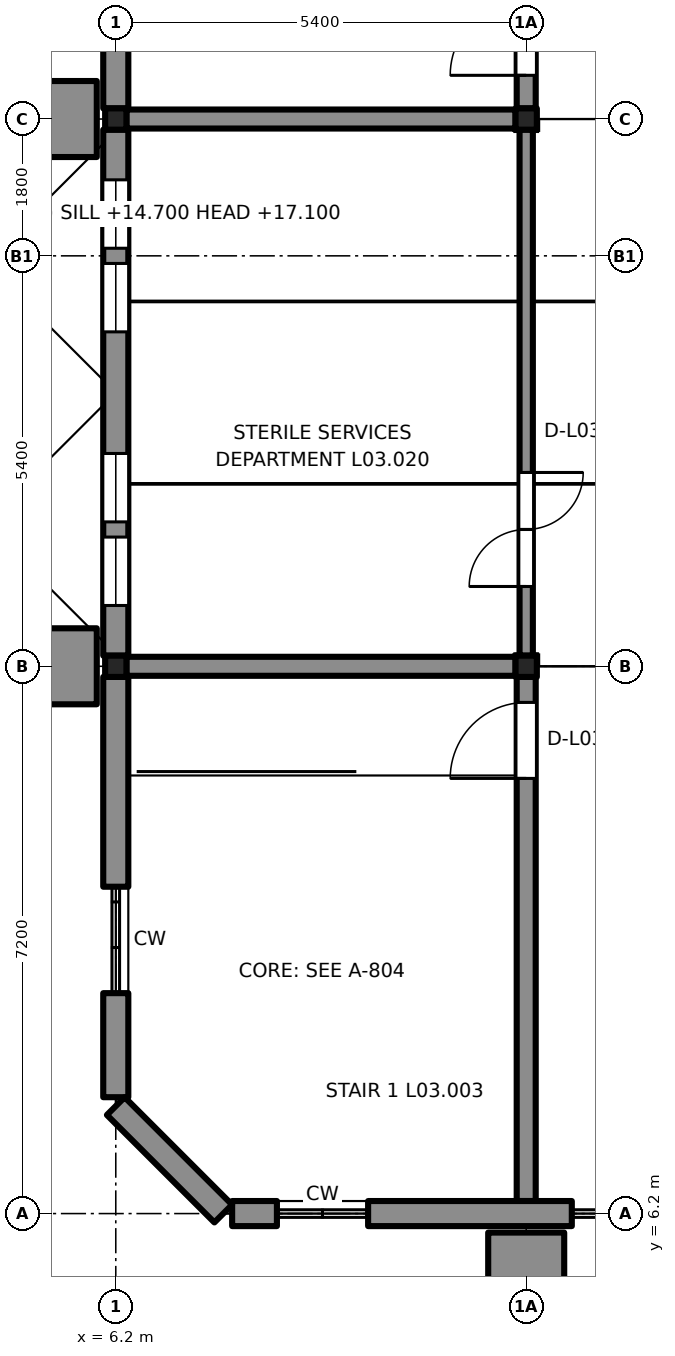
"""IFC4 building model, lengths in metres.
Left out: names, types, materials, properties, quantities, classifications, styles, units other than length and angle.
Written with IfcOpenShell. Run it as: python <this file> out.ifc"""

import sys

from ifc_helpers import new_model, si_unit, direction, frame, frame_2d, origin, origin_2d, place, context, subcontext, project, spatial, rectangle, extrude, element, fill, save


model = new_model("IFC4")
c1 = context("Model", 3, precision=1e-05, world=origin(), true_north=direction((0.0, 1.0)))
c2 = subcontext(c1, "Body", "Model", "MODEL_VIEW")
j1 = project(units=[si_unit("LENGTHUNIT", "METRE"), si_unit("PLANEANGLEUNIT", "RADIAN")], contexts=[c1])
p1 = place(None, origin())
s1 = spatial("IfcSite", under=j1, at=p1, CompositionType="ELEMENT")
p2 = place(p1, origin())
s2 = spatial("IfcBuilding", under=s1, at=p2, CompositionType="ELEMENT")
p3 = place(p2, frame((0.0, 0.0, 14.1)))
s3 = spatial("IfcBuildingStorey", under=s2, at=p3, CompositionType="ELEMENT", Elevation=14.1)
for number, where, z_axis, x_axis in (
    (1, (6.2, 13.4, 0.0), (0.0, 0.0, 1.0), (1.0, 0.0, 0.0)),
    (2, (11.6, 13.4, 0.0), (0.0, 0.0, 1.0), (1.0, 0.0, 0.0)),
    (3, (6.2, 20.6, 0.0), (0.0, 0.0, 1.0), (1.0, 0.0, 0.0)),
    (4, (11.6, 20.6, 0.0), (0.0, 0.0, 1.0), (1.0, 0.0, 0.0)),
):
    element("IfcColumn", number, at=place(p3, frame(where, z_axis=z_axis, x_axis=x_axis)), inside=s3, PredefinedType="COLUMN", context=c2, shape_type="SweptSolid", body=[
        extrude(rectangle(XDim=0.28, YDim=0.28, at=origin_2d()), origin(), (0.0, 0.0, 1.0), 3.9),
    ])
p4 = place(p3, frame((11.6, 6.365, 0.0), z_axis=(0.0, 0.0, 1.0), x_axis=(0.0, 1.0, 0.0)))
e5 = element("IfcWall", 5, at=p4, inside=s3, PredefinedType="SHEAR", context=c2, shape_type="SweptSolid", body=[
    extrude(rectangle(XDim=6.895, YDim=0.25, at=frame_2d((3.448, 0.0))), origin(), (0.0, 0.0, 1.0), 3.2),
])
p5 = place(p4, frame((5.56, 0.0, 0.0)))
e6 = element("IfcOpeningElement", 6, at=p5, cuts=e5, PredefinedType="OPENING", context=c2, shape_type="SweptSolid", body=[
    extrude(rectangle(XDim=1.0, YDim=2.1, at=frame_2d((0.5, 1.05))), frame((0.0, 0.135, 0.0), z_axis=(0.0, -1.0, 0.0), x_axis=(1.0, 0.0, 0.0)), (0.0, 0.0, 1.0), 0.27),
])
p6 = place(p3, frame((6.34, 13.4, 0.0), z_axis=(0.0, 0.0, 1.0), x_axis=(1.0, 0.0, 0.0)))
e7 = element("IfcWall", 7, at=p6, inside=s3, PredefinedType="SHEAR", context=c2, shape_type="SweptSolid", body=[
    extrude(rectangle(XDim=5.12, YDim=0.25, at=frame_2d((2.56, 0.0))), origin(), (0.0, 0.0, 1.0), 3.2),
])
p7 = place(p3, frame((11.6, 20.74, 0.0), z_axis=(0.0, 0.0, 1.0), x_axis=(0.0, 1.0, 0.0)))
e8 = element("IfcWall", 8, at=p7, inside=s3, PredefinedType="SHEAR", context=c2, shape_type="SweptSolid", body=[
    extrude(rectangle(XDim=6.92, YDim=0.25, at=frame_2d((3.46, 0.0))), origin(), (0.0, 0.0, 1.0), 3.2),
])
p8 = place(p7, frame((0.435, 0.0, 0.0)))
e9 = element("IfcOpeningElement", 9, at=p8, cuts=e8, PredefinedType="OPENING", context=c2, shape_type="SweptSolid", body=[
    extrude(rectangle(XDim=1.0, YDim=2.1, at=frame_2d((0.5, 1.05))), frame((0.0, 0.135, 0.0), z_axis=(0.0, -1.0, 0.0), x_axis=(1.0, 0.0, 0.0)), (0.0, 0.0, 1.0), 0.27),
])
p9 = place(p3, frame((6.34, 20.6, 0.0), z_axis=(0.0, 0.0, 1.0), x_axis=(1.0, 0.0, 0.0)))
e10 = element("IfcWall", 10, at=p9, inside=s3, PredefinedType="SHEAR", context=c2, shape_type="SweptSolid", body=[
    extrude(rectangle(XDim=5.12, YDim=0.25, at=frame_2d((2.56, 0.0))), origin(), (0.0, 0.0, 1.0), 3.2),
])
p10 = place(p3, frame((6.2, 7.731, 0.0), z_axis=(0.0, 0.0, 1.0), x_axis=(0.0, 1.0, 0.0)))
e11 = element("IfcWall", 11, at=p10, inside=s3, PredefinedType="SOLIDWALL", context=c2, shape_type="SweptSolid", body=[
    extrude(rectangle(XDim=1.369, YDim=0.33, at=frame_2d((0.685, 0.0))), origin(), (0.0, 0.0, 1.0), 3.2),
])
p11 = place(p3, frame((6.2, 10.5, 0.0), z_axis=(0.0, 0.0, 1.0), x_axis=(0.0, 1.0, 0.0)))
e12 = element("IfcWall", 12, at=p11, inside=s3, PredefinedType="SOLIDWALL", context=c2, shape_type="SweptSolid", body=[
    extrude(rectangle(XDim=2.76, YDim=0.33, at=frame_2d((1.38, 0.0))), origin(), (0.0, 0.0, 1.0), 3.2),
])
p12 = place(p3, frame((6.2, 13.54, 0.0), z_axis=(0.0, 0.0, 1.0), x_axis=(0.0, 1.0, 0.0)))
e13 = element("IfcWall", 13, at=p12, inside=s3, PredefinedType="SOLIDWALL", context=c2, shape_type="SweptSolid", body=[
    extrude(rectangle(XDim=6.92, YDim=0.33, at=frame_2d((3.46, 0.0))), origin(), (0.0, 0.0, 1.0), 3.2),
])
p13 = place(p12, frame((0.66, 0.0, 0.6)))
e14 = element("IfcOpeningElement", 14, at=p13, cuts=e13, PredefinedType="OPENING", context=c2, shape_type="SweptSolid", body=[
    extrude(rectangle(XDim=0.9, YDim=2.4, at=frame_2d((0.45, 1.2))), frame((0.0, 0.175, 0.0), z_axis=(0.0, -1.0, 0.0), x_axis=(1.0, 0.0, 0.0)), (0.0, 0.0, 1.0), 0.35),
])
p14 = place(p12, frame((1.76, 0.0, 0.6)))
e15 = element("IfcOpeningElement", 15, at=p14, cuts=e13, PredefinedType="OPENING", context=c2, shape_type="SweptSolid", body=[
    extrude(rectangle(XDim=0.9, YDim=2.4, at=frame_2d((0.45, 1.2))), frame((0.0, 0.175, 0.0), z_axis=(0.0, -1.0, 0.0), x_axis=(1.0, 0.0, 0.0)), (0.0, 0.0, 1.0), 0.35),
])
p15 = place(p12, frame((4.26, 0.0, 0.6)))
e16 = element("IfcOpeningElement", 16, at=p15, cuts=e13, PredefinedType="OPENING", context=c2, shape_type="SweptSolid", body=[
    extrude(rectangle(XDim=0.9, YDim=2.4, at=frame_2d((0.45, 1.2))), frame((0.0, 0.175, 0.0), z_axis=(0.0, -1.0, 0.0), x_axis=(1.0, 0.0, 0.0)), (0.0, 0.0, 1.0), 0.35),
])
p16 = place(p12, frame((5.36, 0.0, 0.6)))
e17 = element("IfcOpeningElement", 17, at=p16, cuts=e13, PredefinedType="OPENING", context=c2, shape_type="SweptSolid", body=[
    extrude(rectangle(XDim=0.9, YDim=2.4, at=frame_2d((0.45, 1.2))), frame((0.0, 0.175, 0.0), z_axis=(0.0, -1.0, 0.0), x_axis=(1.0, 0.0, 0.0)), (0.0, 0.0, 1.0), 0.35),
])
p17 = place(p3, frame((6.2, 20.74, 0.0), z_axis=(0.0, 0.0, 1.0), x_axis=(0.0, 1.0, 0.0)))
e18 = element("IfcWall", 18, at=p17, inside=s3, PredefinedType="SOLIDWALL", context=c2, shape_type="SweptSolid", body=[
    extrude(rectangle(XDim=2.76, YDim=0.33, at=frame_2d((1.38, 0.0))), origin(), (0.0, 0.0, 1.0), 3.2),
])
for number, where, z_axis, x_axis in (
    (19, (5.575, 12.9, 0.0), (0.0, 0.0, 1.0), (0.0, 1.0, 0.0)),
    (20, (5.575, 20.1, 0.0), (0.0, 0.0, 1.0), (0.0, 1.0, 0.0)),
):
    element("IfcWall", number, at=place(p3, frame(where, z_axis=z_axis, x_axis=x_axis)), inside=s3, PredefinedType="SOLIDWALL", context=c2, shape_type="SweptSolid", body=[
        extrude(rectangle(XDim=1.0, YDim=0.75, at=frame_2d((0.5, 0.0))), origin(), (0.0, 0.0, 1.0), 3.9),
    ])
p18 = place(p3, frame((8.32, 6.2, 0.0), z_axis=(0.0, 0.0, 1.0), x_axis=(-1.0, 0.0, 0.0)))
e21 = element("IfcWall", 21, at=p18, inside=s3, PredefinedType="SOLIDWALL", context=c2, shape_type="SweptSolid", body=[
    extrude(rectangle(XDim=0.589, YDim=0.33, at=frame_2d((0.294, 0.0))), origin(), (0.0, 0.0, 1.0), 3.2),
])
p19 = place(p3, frame((12.2, 6.2, 0.0), z_axis=(0.0, 0.0, 1.0), x_axis=(-1.0, 0.0, 0.0)))
e22 = element("IfcWall", 22, at=p19, inside=s3, PredefinedType="SOLIDWALL", context=c2, shape_type="SweptSolid", body=[
    extrude(rectangle(XDim=2.68, YDim=0.33, at=frame_2d((1.34, 0.0))), origin(), (0.0, 0.0, 1.0), 3.2),
])
p20 = place(p3, frame((12.1, 5.575, 0.0), z_axis=(0.0, 0.0, 1.0), x_axis=(-1.0, 0.0, 0.0)))
e23 = element("IfcWall", 23, at=p20, inside=s3, PredefinedType="SOLIDWALL", context=c2, shape_type="SweptSolid", body=[
    extrude(rectangle(XDim=1.0, YDim=0.75, at=frame_2d((0.5, 0.0))), origin(), (0.0, 0.0, 1.0), 3.9),
])
p21 = place(p3, frame((6.2, 7.614, 0.0), z_axis=(0.0, 0.0, 1.0), x_axis=(0.707106781187, -0.707106781187, 0.0)))
e24 = element("IfcWall", 24, at=p21, inside=s3, PredefinedType="SOLIDWALL", context=c2, shape_type="SweptSolid", body=[
    extrude(rectangle(XDim=2.0, YDim=0.33, at=frame_2d((1.0, 0.0))), origin(), (0.0, 0.0, 1.0), 3.2),
])
p22 = place(p3, frame((6.25, 7.614, 3.6), z_axis=(0.0, 0.0, 1.0), x_axis=(0.0, 1.0, 0.0)))
e25 = element("IfcWall", 25, at=p22, inside=s3, PredefinedType="SOLIDWALL", context=c2, shape_type="SweptSolid", body=[
    extrude(rectangle(XDim=1.586, YDim=0.23, at=frame_2d((0.793, 0.0))), origin(), (0.0, 0.0, 1.0), 2.7),
])
p23 = place(p3, frame((6.25, 9.2, 3.6), z_axis=(0.0, 0.0, 1.0), x_axis=(0.0, 1.0, 0.0)))
e26 = element("IfcWall", 26, at=p23, inside=s3, PredefinedType="SOLIDWALL", context=c2, shape_type="SweptSolid", body=[
    extrude(rectangle(XDim=1.2, YDim=0.23, at=frame_2d((0.6, 0.0))), origin(), (0.0, 0.0, 1.0), 3.7),
])
p24 = place(p3, frame((6.25, 10.4, 3.6), z_axis=(0.0, 0.0, 1.0), x_axis=(0.0, 1.0, 0.0)))
e27 = element("IfcWall", 27, at=p24, inside=s3, PredefinedType="SOLIDWALL", context=c2, shape_type="SweptSolid", body=[
    extrude(rectangle(XDim=1.5, YDim=0.23, at=frame_2d((0.75, 0.0))), origin(), (0.0, 0.0, 1.0), 2.7),
])
for number, where, z_axis, x_axis in (
    (28, (6.25, 11.9, 3.6), (0.0, 0.0, 1.0), (0.0, 1.0, 0.0)),
    (29, (6.25, 20.6, 3.6), (0.0, 0.0, 1.0), (0.0, 1.0, 0.0)),
):
    element("IfcWall", number, at=place(p3, frame(where, z_axis=z_axis, x_axis=x_axis)), inside=s3, PredefinedType="SOLIDWALL", context=c2, shape_type="SweptSolid", body=[
        extrude(rectangle(XDim=1.5, YDim=0.23, at=frame_2d((0.75, 0.0))), origin(), (0.0, 0.0, 1.0), 1.7),
    ])
p25 = place(p3, frame((9.2, 6.25, 3.6), z_axis=(0.0, 0.0, 1.0), x_axis=(-1.0, 0.0, 0.0)))
e30 = element("IfcWall", 30, at=p25, inside=s3, PredefinedType="SOLIDWALL", context=c2, shape_type="SweptSolid", body=[
    extrude(rectangle(XDim=1.5, YDim=0.23, at=frame_2d((0.75, 0.0))), origin(), (0.0, 0.0, 1.0), 2.7),
])
p26 = place(p3, frame((10.4, 6.25, 3.6), z_axis=(0.0, 0.0, 1.0), x_axis=(-1.0, 0.0, 0.0)))
e31 = element("IfcWall", 31, at=p26, inside=s3, PredefinedType="SOLIDWALL", context=c2, shape_type="SweptSolid", body=[
    extrude(rectangle(XDim=1.2, YDim=0.23, at=frame_2d((0.6, 0.0))), origin(), (0.0, 0.0, 1.0), 3.7),
])
p27 = place(p3, frame((11.9, 6.25, 3.6), z_axis=(0.0, 0.0, 1.0), x_axis=(-1.0, 0.0, 0.0)))
e32 = element("IfcWall", 32, at=p27, inside=s3, PredefinedType="SOLIDWALL", context=c2, shape_type="SweptSolid", body=[
    extrude(rectangle(XDim=1.5, YDim=0.23, at=frame_2d((0.75, 0.0))), origin(), (0.0, 0.0, 1.0), 2.7),
])
p28 = place(p3, frame((13.4, 6.25, 3.6), z_axis=(0.0, 0.0, 1.0), x_axis=(-1.0, 0.0, 0.0)))
e33 = element("IfcWall", 33, at=p28, inside=s3, PredefinedType="SOLIDWALL", context=c2, shape_type="SweptSolid", body=[
    extrude(rectangle(XDim=1.5, YDim=0.23, at=frame_2d((0.75, 0.0))), origin(), (0.0, 0.0, 1.0), 1.7),
])
p29 = place(p3, frame((6.2, 7.614, 3.6), z_axis=(0.0, 0.0, 1.0), x_axis=(0.707106781187, -0.707106781187, 0.0)))
e34 = element("IfcWall", 34, at=p29, inside=s3, PredefinedType="SOLIDWALL", context=c2, shape_type="SweptSolid", body=[
    extrude(rectangle(XDim=0.6, YDim=0.23, at=frame_2d((0.3, 0.0))), origin(), (0.0, 0.0, 1.0), 1.7),
])
p30 = place(p3, frame((6.624, 7.19, 3.6), z_axis=(0.0, 0.0, 1.0), x_axis=(0.707106781187, -0.707106781187, 0.0)))
e35 = element("IfcWall", 35, at=p30, inside=s3, PredefinedType="SOLIDWALL", context=c2, shape_type="SweptSolid", body=[
    extrude(rectangle(XDim=0.8, YDim=0.23, at=frame_2d((0.4, 0.0))), origin(), (0.0, 0.0, 1.0), 2.7),
])
p31 = place(p3, frame((7.19, 6.624, 3.6), z_axis=(0.0, 0.0, 1.0), x_axis=(0.707106781187, -0.707106781187, 0.0)))
e36 = element("IfcWall", 36, at=p31, inside=s3, PredefinedType="SOLIDWALL", context=c2, shape_type="SweptSolid", body=[
    extrude(rectangle(XDim=0.6, YDim=0.23, at=frame_2d((0.3, 0.0))), origin(), (0.0, 0.0, 1.0), 1.7),
])
p32 = place(p3, frame((6.2, 13.54, 3.2), z_axis=(0.0, 0.0, 1.0), x_axis=(0.0, 1.0, 0.0)))
e37 = element("IfcWall", 37, at=p32, inside=s3, PredefinedType="SOLIDWALL", context=c2, shape_type="SweptSolid", body=[
    extrude(rectangle(XDim=1.36, YDim=0.23, at=frame_2d((0.68, 0.0))), origin(), (0.0, 0.0, 1.0), 2.1),
])
p33 = place(p3, frame((6.2, 14.9, 3.2), z_axis=(0.0, 0.0, 1.0), x_axis=(0.0, 1.0, 0.0)))
e38 = element("IfcWall", 38, at=p33, inside=s3, PredefinedType="SOLIDWALL", context=c2, shape_type="SweptSolid", body=[
    extrude(rectangle(XDim=1.5, YDim=0.23, at=frame_2d((0.75, 0.0))), origin(), (0.0, 0.0, 1.0), 3.1),
])
p34 = place(p3, frame((6.2, 16.4, 3.2), z_axis=(0.0, 0.0, 1.0), x_axis=(0.0, 1.0, 0.0)))
e39 = element("IfcWall", 39, at=p34, inside=s3, PredefinedType="SOLIDWALL", context=c2, shape_type="SweptSolid", body=[
    extrude(rectangle(XDim=1.2, YDim=0.23, at=frame_2d((0.6, 0.0))), origin(), (0.0, 0.0, 1.0), 4.1),
])
p35 = place(p3, frame((6.2, 17.6, 3.2), z_axis=(0.0, 0.0, 1.0), x_axis=(0.0, 1.0, 0.0)))
e40 = element("IfcWall", 40, at=p35, inside=s3, PredefinedType="SOLIDWALL", context=c2, shape_type="SweptSolid", body=[
    extrude(rectangle(XDim=1.5, YDim=0.23, at=frame_2d((0.75, 0.0))), origin(), (0.0, 0.0, 1.0), 3.1),
])
p36 = place(p3, frame((6.2, 19.1, 3.2), z_axis=(0.0, 0.0, 1.0), x_axis=(0.0, 1.0, 0.0)))
e41 = element("IfcWall", 41, at=p36, inside=s3, PredefinedType="SOLIDWALL", context=c2, shape_type="SweptSolid", body=[
    extrude(rectangle(XDim=1.36, YDim=0.23, at=frame_2d((0.68, 0.0))), origin(), (0.0, 0.0, 1.0), 2.1),
])
p37 = place(p3, frame((11.6, 13.54, 0.0), z_axis=(0.0, 0.0, 1.0), x_axis=(0.0, 1.0, 0.0)))
e42 = element("IfcWall", 42, at=p37, inside=s3, PredefinedType="PARTITIONING", context=c2, shape_type="SweptSolid", body=[
    extrude(rectangle(XDim=6.92, YDim=0.175, at=frame_2d((3.46, 0.0))), origin(), (0.0, 0.0, 1.0), 5.485),
])
p38 = place(p37, frame((0.91, 0.0, 0.0)))
e43 = element("IfcOpeningElement", 43, at=p38, cuts=e42, PredefinedType="OPENING", context=c2, shape_type="SweptSolid", body=[
    extrude(rectangle(XDim=1.5, YDim=2.1, at=frame_2d((0.75, 1.05))), frame((0.0, 0.097, 0.0), z_axis=(0.0, -1.0, 0.0), x_axis=(1.0, 0.0, 0.0)), (0.0, 0.0, 1.0), 0.195),
])
p39 = place(p5, origin())
e44 = element("IfcDoor", 44, at=p39, inside=s3, OperationType="SINGLE_SWING_LEFT", PredefinedType="DOOR", context=c2, shape_type="SweptSolid", body=[
    extrude(rectangle(XDim=1.0, YDim=2.1, at=frame_2d((0.5, 1.05))), frame((0.0, 0.025, 0.0), z_axis=(0.0, -1.0, 0.0), x_axis=(1.0, 0.0, 0.0)), (0.0, 0.0, 1.0), 0.05),
])
fill(e6, e44)
p40 = place(p8, origin())
e45 = element("IfcDoor", 45, at=p40, inside=s3, OperationType="SINGLE_SWING_RIGHT", PredefinedType="DOOR", context=c2, shape_type="SweptSolid", body=[
    extrude(rectangle(XDim=1.0, YDim=2.1, at=frame_2d((0.5, 1.05))), frame((0.0, 0.025, 0.0), z_axis=(0.0, -1.0, 0.0), x_axis=(1.0, 0.0, 0.0)), (0.0, 0.0, 1.0), 0.05),
])
fill(e9, e45)
p41 = place(p13, origin())
e46 = element("IfcWindow", 46, at=p41, inside=s3, PartitioningType="SINGLE_PANEL", PredefinedType="WINDOW", context=c2, shape_type="SweptSolid", body=[
    extrude(rectangle(XDim=0.9, YDim=2.4, at=frame_2d((0.45, 1.2))), frame((0.0, -0.03, 0.0), z_axis=(0.0, -1.0, 0.0), x_axis=(1.0, 0.0, 0.0)), (0.0, 0.0, 1.0), 0.06),
])
fill(e14, e46)
p42 = place(p14, origin())
e47 = element("IfcWindow", 47, at=p42, inside=s3, PartitioningType="SINGLE_PANEL", PredefinedType="WINDOW", context=c2, shape_type="SweptSolid", body=[
    extrude(rectangle(XDim=0.9, YDim=2.4, at=frame_2d((0.45, 1.2))), frame((0.0, -0.03, 0.0), z_axis=(0.0, -1.0, 0.0), x_axis=(1.0, 0.0, 0.0)), (0.0, 0.0, 1.0), 0.06),
])
fill(e15, e47)
p43 = place(p15, origin())
e48 = element("IfcWindow", 48, at=p43, inside=s3, PartitioningType="SINGLE_PANEL", PredefinedType="WINDOW", context=c2, shape_type="SweptSolid", body=[
    extrude(rectangle(XDim=0.9, YDim=2.4, at=frame_2d((0.45, 1.2))), frame((0.0, -0.03, 0.0), z_axis=(0.0, -1.0, 0.0), x_axis=(1.0, 0.0, 0.0)), (0.0, 0.0, 1.0), 0.06),
])
fill(e16, e48)
p44 = place(p16, origin())
e49 = element("IfcWindow", 49, at=p44, inside=s3, PartitioningType="SINGLE_PANEL", PredefinedType="WINDOW", context=c2, shape_type="SweptSolid", body=[
    extrude(rectangle(XDim=0.9, YDim=2.4, at=frame_2d((0.45, 1.2))), frame((0.0, -0.03, 0.0), z_axis=(0.0, -1.0, 0.0), x_axis=(1.0, 0.0, 0.0)), (0.0, 0.0, 1.0), 0.06),
])
fill(e17, e49)
p45 = place(p38, origin())
e50 = element("IfcDoor", 50, at=p45, inside=s3, OperationType="DOUBLE_DOOR_SINGLE_SWING", PredefinedType="DOOR", context=c2, shape_type="SweptSolid", body=[
    extrude(rectangle(XDim=1.5, YDim=2.1, at=frame_2d((0.75, 1.05))), frame((0.0, 0.025, 0.0), z_axis=(0.0, -1.0, 0.0), x_axis=(1.0, 0.0, 0.0)), (0.0, 0.0, 1.0), 0.05),
])
fill(e43, e50)
save(model, sys.argv[1])
